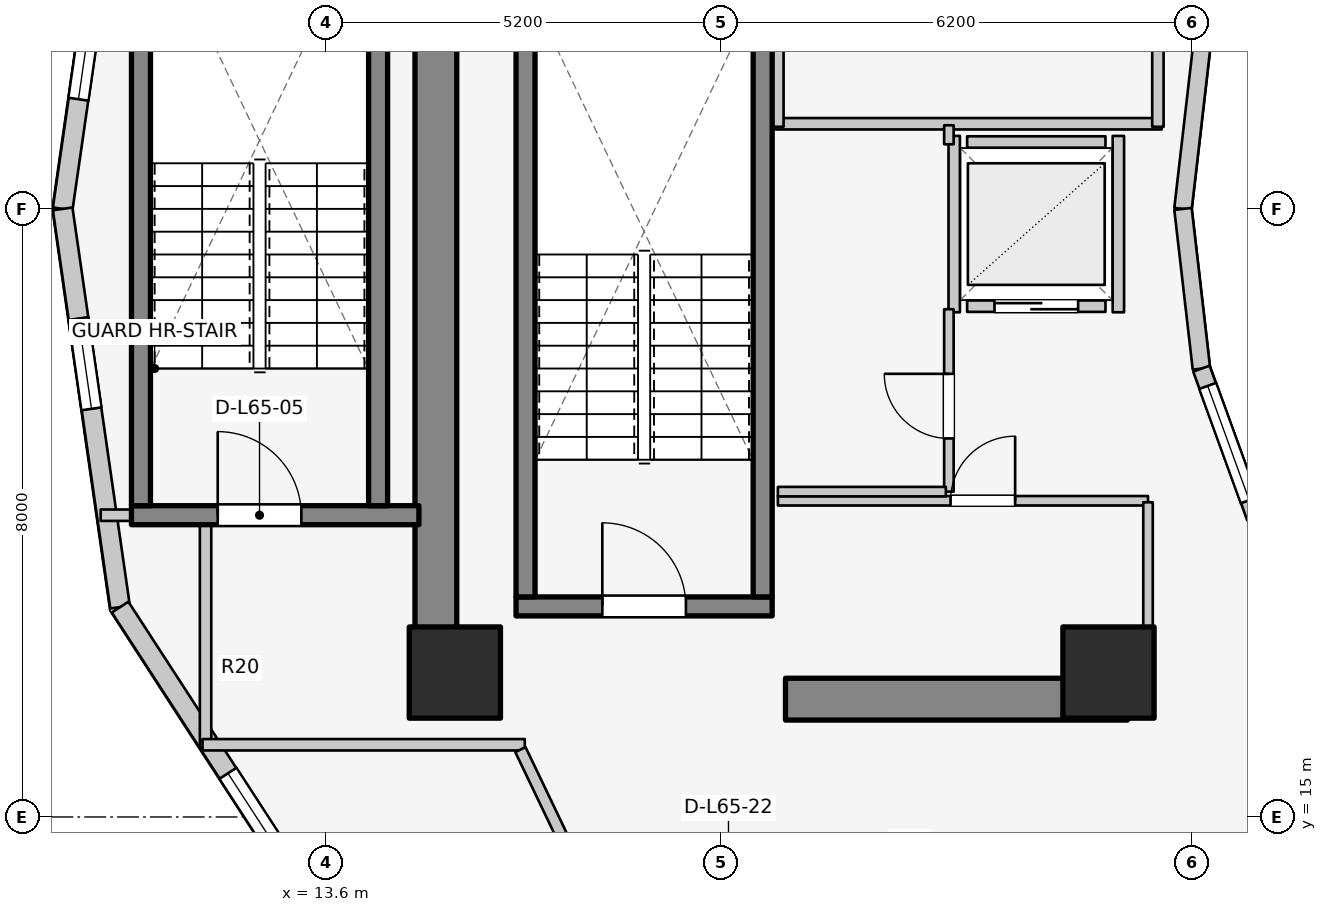
"""IFC4 building model, lengths in metres.
Left out: names, types, materials, properties, quantities, classifications, styles, units other than length and angle.
Written with IfcOpenShell. Run it as: python <this file> out.ifc"""

import sys

from ifc_helpers import new_model, si_unit, direction, frame, frame_2d, origin, origin_2d, place, context, subcontext, project, spatial, rectangle, extrude, element, fill, save


model = new_model("IFC4")
c1 = context("Model", 3, precision=1e-05, world=origin(), true_north=direction((0.0, 1.0)))
c2 = subcontext(c1, "Body", "Model", "MODEL_VIEW")
j1 = project(units=[si_unit("LENGTHUNIT", "METRE"), si_unit("PLANEANGLEUNIT", "RADIAN")], contexts=[c1])
p1 = place(None, origin())
s1 = spatial("IfcSite", under=j1, at=p1, CompositionType="ELEMENT")
p2 = place(p1, origin())
s2 = spatial("IfcBuilding", under=s1, at=p2, CompositionType="ELEMENT")
p3 = place(p2, frame((0.0, 0.0, 214.0)))
s3 = spatial("IfcBuildingStorey", under=s2, at=p3, CompositionType="ELEMENT", Elevation=214.0)
p4 = place(p3, frame((15.05, 17.05, 0.0), z_axis=(0.0, 0.0, 1.0), x_axis=(0.0, 1.0, 0.0)))
e1 = element("IfcWall", 1, at=p4, inside=s3, PredefinedType="SHEAR", context=c2, shape_type="SweptSolid", body=[
    extrude(rectangle(XDim=12.8, YDim=0.55, at=frame_2d((6.4, 0.0))), origin(), (0.0, 0.0, 1.0), 3.1),
])
p5 = place(p3, frame((19.65, 16.55, 0.0), z_axis=(0.0, 0.0, 1.0), x_axis=(1.0, 0.0, 0.0)))
e2 = element("IfcWall", 2, at=p5, inside=s3, PredefinedType="SHEAR", context=c2, shape_type="SweptSolid", body=[
    extrude(rectangle(XDim=4.5, YDim=0.55, at=frame_2d((2.25, 0.0))), origin(), (0.0, 0.0, 1.0), 3.1),
])
p6 = place(p3, frame((16.105, 17.77, 0.0), z_axis=(0.0, 0.0, 1.0), x_axis=(1.0, 0.0, 0.0)))
e3 = element("IfcWall", 3, at=p6, inside=s3, PredefinedType="SOLIDWALL", context=c2, shape_type="SweptSolid", body=[
    extrude(rectangle(XDim=3.37, YDim=0.25, at=frame_2d((1.685, 0.0))), origin(), (0.0, 0.0, 1.0), 3.1),
])
p7 = place(p6, frame((1.135, 0.0, 0.0)))
e4 = element("IfcOpeningElement", 4, at=p7, cuts=e3, PredefinedType="OPENING", context=c2, shape_type="SweptSolid", body=[
    extrude(rectangle(XDim=1.1, YDim=2.1, at=frame_2d((0.55, 1.05))), frame((0.0, 0.135, 0.0), z_axis=(0.0, -1.0, 0.0), x_axis=(1.0, 0.0, 0.0)), (0.0, 0.0, 1.0), 0.27),
])
for number, where, z_axis, x_axis in (
    (5, (16.23, 17.895, 0.0), (0.0, 0.0, 1.0), (0.0, 1.0, 0.0)),
    (6, (19.35, 17.895, 0.0), (0.0, 0.0, 1.0), (0.0, 1.0, 0.0)),
):
    element("IfcWall", number, at=place(p3, frame(where, z_axis=z_axis, x_axis=x_axis)), inside=s3, PredefinedType="SOLIDWALL", context=c2, shape_type="SweptSolid", body=[
        extrude(rectangle(XDim=7.81, YDim=0.25, at=frame_2d((3.905, 0.0))), origin(), (0.0, 0.0, 1.0), 3.1),
    ])
p8 = place(p3, frame((11.045, 18.97, 0.0), z_axis=(0.0, 0.0, 1.0), x_axis=(1.0, 0.0, 0.0)))
e7 = element("IfcWall", 7, at=p8, inside=s3, PredefinedType="SOLIDWALL", context=c2, shape_type="SweptSolid", body=[
    extrude(rectangle(XDim=3.782, YDim=0.25, at=frame_2d((1.891, 0.0))), origin(), (0.0, 0.0, 1.0), 3.1),
])
p9 = place(p8, frame((1.135, 0.0, 0.0)))
e8 = element("IfcOpeningElement", 8, at=p9, cuts=e7, PredefinedType="OPENING", context=c2, shape_type="SweptSolid", body=[
    extrude(rectangle(XDim=1.1, YDim=2.1, at=frame_2d((0.55, 1.05))), frame((0.0, 0.135, 0.0), z_axis=(0.0, -1.0, 0.0), x_axis=(1.0, 0.0, 0.0)), (0.0, 0.0, 1.0), 0.27),
])
for number, where, z_axis, x_axis in (
    (9, (11.17, 19.095, 0.0), (0.0, 0.0, 1.0), (0.0, 1.0, 0.0)),
    (10, (14.29, 19.095, 0.0), (0.0, 0.0, 1.0), (0.0, 1.0, 0.0)),
):
    element("IfcWall", number, at=place(p3, frame(where, z_axis=z_axis, x_axis=x_axis)), inside=s3, PredefinedType="SOLIDWALL", context=c2, shape_type="SweptSolid", body=[
        extrude(rectangle(XDim=7.81, YDim=0.25, at=frame_2d((3.905, 0.0))), origin(), (0.0, 0.0, 1.0), 3.1),
    ])
for number, where, z_axis, x_axis in (
    (11, (15.3, 16.9, 0.0), (0.0, 0.0, 1.0), (1.0, 0.0, 0.0)),
    (12, (23.9, 16.9, 0.0), (0.0, 0.0, 1.0), (1.0, 0.0, 0.0)),
):
    element("IfcColumn", number, at=place(p3, frame(where, z_axis=z_axis, x_axis=x_axis)), inside=s3, PredefinedType="COLUMN", context=c2, shape_type="SweptSolid", body=[
        extrude(rectangle(XDim=1.2, YDim=1.2, at=origin_2d()), origin(), (0.0, 0.0, 1.0), 3.1),
    ])
for number, where, z_axis, x_axis in (
    (13, (25.123, 25.102, 0.0), (0.0, 0.0, 1.0), (-0.115, -0.993, 0.0)),
    (14, (24.88, 23.0, 0.0), (0.0, 0.0, 1.0), (0.115, -0.993, 0.0)),
):
    element("IfcWall", number, at=place(p3, frame(where, z_axis=z_axis, x_axis=x_axis)), inside=s3, PredefinedType="STANDARD", context=c2, shape_type="SweptSolid", body=[
        extrude(rectangle(XDim=2.115, YDim=0.23, at=frame_2d((1.058, 0.0))), origin(), (0.0, 0.0, 1.0), 2.84),
    ])
p10 = place(p3, frame((25.123, 20.898, 0.0), z_axis=(0.0, 0.0, 1.0), x_axis=(0.341423187295, -0.93990968033, 0.0)))
e15 = element("IfcWall", 15, at=p10, inside=s3, PredefinedType="STANDARD", context=c2, shape_type="SweptSolid", body=[
    extrude(rectangle(XDim=2.084, YDim=0.23, at=frame_2d((1.042, 0.0))), origin(), (0.0, 0.0, 1.0), 2.84),
])
p11 = place(p10, frame((0.242, 0.0, 0.85)))
e16 = element("IfcOpeningElement", 16, at=p11, cuts=e15, PredefinedType="OPENING", context=c2, shape_type="SweptSolid", body=[
    extrude(rectangle(XDim=1.6, YDim=1.65, at=frame_2d((0.8, 0.825))), frame((0.0, 0.125, 0.0), z_axis=(0.0, -1.0, 0.0), x_axis=(1.0, 0.0, 0.0)), (0.0, 0.0, 1.0), 0.25),
])
p12 = place(p3, frame((10.895, 28.239, 0.0), z_axis=(0.0, 0.0, 1.0), x_axis=(-0.142712754019, -0.989764148593, 0.0)))
e17 = element("IfcWall", 17, at=p12, inside=s3, PredefinedType="STANDARD", context=c2, shape_type="SweptSolid", body=[
    extrude(rectangle(XDim=5.293, YDim=0.26, at=frame_2d((2.646, 0.0))), origin(), (0.0, 0.0, 1.0), 2.85),
])
p13 = place(p12, frame((2.635, 0.0, 0.75)))
e18 = element("IfcOpeningElement", 18, at=p13, cuts=e17, PredefinedType="OPENING", context=c2, shape_type="SweptSolid", body=[
    extrude(rectangle(XDim=1.2, YDim=1.5, at=frame_2d((0.6, 0.75))), frame((0.0, 0.14, 0.0), z_axis=(0.0, -1.0, 0.0), x_axis=(1.0, 0.0, 0.0)), (0.0, 0.0, 1.0), 0.28),
])
p14 = place(p3, frame((10.14, 23.0, 0.0), z_axis=(0.0, 0.0, 1.0), x_axis=(0.142712754019, -0.989764148593, 0.0)))
e19 = element("IfcWall", 19, at=p14, inside=s3, PredefinedType="STANDARD", context=c2, shape_type="SweptSolid", body=[
    extrude(rectangle(XDim=5.293, YDim=0.26, at=frame_2d((2.646, 0.0))), origin(), (0.0, 0.0, 1.0), 2.85),
])
p15 = place(p14, frame((1.458, 0.0, 0.75)))
e20 = element("IfcOpeningElement", 20, at=p15, cuts=e19, PredefinedType="OPENING", context=c2, shape_type="SweptSolid", body=[
    extrude(rectangle(XDim=1.2, YDim=1.5, at=frame_2d((0.6, 0.75))), frame((0.0, 0.14, 0.0), z_axis=(0.0, -1.0, 0.0), x_axis=(1.0, 0.0, 0.0)), (0.0, 0.0, 1.0), 0.28),
])
p16 = place(p3, frame((10.895, 17.761, 0.0), z_axis=(0.0, 0.0, 1.0), x_axis=(0.544475908819, -0.838776480784, 0.0)))
e21 = element("IfcWall", 21, at=p16, inside=s3, PredefinedType="STANDARD", context=c2, shape_type="SweptSolid", body=[
    extrude(rectangle(XDim=4.305, YDim=0.26, at=frame_2d((2.152, 0.0))), origin(), (0.0, 0.0, 1.0), 2.85),
])
p17 = place(p16, frame((2.607, 0.0, 0.75)))
e22 = element("IfcOpeningElement", 22, at=p17, cuts=e21, PredefinedType="OPENING", context=c2, shape_type="SweptSolid", body=[
    extrude(rectangle(XDim=1.2, YDim=1.5, at=frame_2d((0.6, 0.75))), frame((0.0, 0.14, 0.0), z_axis=(0.0, -1.0, 0.0), x_axis=(1.0, 0.0, 0.0)), (0.0, 0.0, 1.0), 0.28),
])
p18 = place(p3, frame((22.04, 21.72, 0.0), z_axis=(0.0, 0.0, 1.0), x_axis=(1.0, 0.0, 0.0)))
e23 = element("IfcWall", 23, at=p18, inside=s3, PredefinedType="SOLIDWALL", context=c2, shape_type="SweptSolid", body=[
    extrude(rectangle(XDim=1.82, YDim=0.15, at=frame_2d((0.91, 0.0))), origin(), (0.0, 0.0, 1.0), 2.12),
])
p19 = place(p18, frame((0.36, 0.0, 0.0)))
e24 = element("IfcOpeningElement", 24, at=p19, cuts=e23, PredefinedType="OPENING", context=c2, shape_type="SweptSolid", body=[
    extrude(rectangle(XDim=1.1, YDim=2.1, at=frame_2d((0.55, 1.05))), frame((0.0, 0.085, 0.0), z_axis=(0.0, -1.0, 0.0), x_axis=(1.0, 0.0, 0.0)), (0.0, 0.0, 1.0), 0.17),
])
p20 = place(p3, frame((22.04, 23.88, 0.0), z_axis=(0.0, 0.0, 1.0), x_axis=(1.0, 0.0, 0.0)))
e25 = element("IfcWall", 25, at=p20, inside=s3, PredefinedType="SOLIDWALL", context=c2, shape_type="SweptSolid", body=[
    extrude(rectangle(XDim=1.82, YDim=0.15, at=frame_2d((0.91, 0.0))), origin(), (0.0, 0.0, 1.0), 2.12),
])
p21 = place(p3, frame((21.87, 21.64, 0.0), z_axis=(0.0, 0.0, 1.0), x_axis=(0.0, 1.0, 0.0)))
e26 = element("IfcWall", 26, at=p21, inside=s3, PredefinedType="SOLIDWALL", context=c2, shape_type="SweptSolid", body=[
    extrude(rectangle(XDim=2.32, YDim=0.15, at=frame_2d((1.16, 0.0))), origin(), (0.0, 0.0, 1.0), 2.855),
])
p22 = place(p3, frame((24.03, 21.64, 0.0), z_axis=(0.0, 0.0, 1.0), x_axis=(0.0, 1.0, 0.0)))
e27 = element("IfcWall", 27, at=p22, inside=s3, PredefinedType="SOLIDWALL", context=c2, shape_type="SweptSolid", body=[
    extrude(rectangle(XDim=2.32, YDim=0.15, at=frame_2d((1.16, 0.0))), origin(), (0.0, 0.0, 1.0), 2.12),
])
p23 = place(p3, frame((19.52, 24.12, 0.0), z_axis=(0.0, 0.0, 1.0), x_axis=(1.0, 0.0, 0.0)))
e28 = element("IfcWall", 28, at=p23, inside=s3, PredefinedType="PARTITIONING", context=c2, shape_type="SweptSolid", body=[
    extrude(rectangle(XDim=5.08, YDim=0.15, at=frame_2d((2.54, 0.0))), origin(), (0.0, 0.0, 1.0), 2.12),
])
p24 = place(p3, frame((19.55, 24.08, 0.0), z_axis=(0.0, 0.0, 1.0), x_axis=(0.0, 1.0, 0.0)))
e29 = element("IfcWall", 29, at=p24, inside=s3, PredefinedType="PARTITIONING", context=c2, shape_type="SweptSolid", body=[
    extrude(rectangle(XDim=3.2, YDim=0.15, at=frame_2d((1.6, 0.0))), origin(), (0.0, 0.0, 1.0), 2.855),
])
p25 = place(p3, frame((24.55, 24.08, 0.0), z_axis=(0.0, 0.0, 1.0), x_axis=(0.0, 1.0, 0.0)))
e30 = element("IfcWall", 30, at=p25, inside=s3, PredefinedType="PARTITIONING", context=c2, shape_type="SweptSolid", body=[
    extrude(rectangle(XDim=3.4, YDim=0.15, at=frame_2d((1.7, 0.0))), origin(), (0.0, 0.0, 1.0), 2.855),
])
p26 = place(p25, frame((1.894, 0.0, 0.0)))
e31 = element("IfcOpeningElement", 31, at=p26, cuts=e30, PredefinedType="OPENING", context=c2, shape_type="SweptSolid", body=[
    extrude(rectangle(XDim=1.1, YDim=2.1, at=frame_2d((0.55, 1.05))), frame((0.0, 0.085, 0.0), z_axis=(0.0, -1.0, 0.0), x_axis=(1.0, 0.0, 0.0)), (0.0, 0.0, 1.0), 0.17),
])
p27 = place(p3, frame((19.55, 19.16, 0.0), z_axis=(0.0, 0.0, 1.0), x_axis=(1.0, 0.0, 0.0)))
e32 = element("IfcWall", 32, at=p27, inside=s3, PredefinedType="PARTITIONING", context=c2, shape_type="SweptSolid", body=[
    extrude(rectangle(XDim=4.87, YDim=0.125, at=frame_2d((2.435, 0.0))), origin(), (0.0, 0.0, 1.0), 2.12),
])
p28 = place(p27, frame((2.272, 0.0, 0.0)))
e33 = element("IfcOpeningElement", 33, at=p28, cuts=e32, PredefinedType="OPENING", context=c2, shape_type="SweptSolid", body=[
    extrude(rectangle(XDim=0.85, YDim=2.05, at=frame_2d((0.425, 1.025))), frame((0.0, 0.073, 0.0), z_axis=(0.0, -1.0, 0.0), x_axis=(1.0, 0.0, 0.0)), (0.0, 0.0, 1.0), 0.145),
])
p29 = place(p3, frame((24.42, 17.1, 0.0), z_axis=(0.0, 0.0, 1.0), x_axis=(0.0, 1.0, 0.0)))
e34 = element("IfcWall", 34, at=p29, inside=s3, PredefinedType="PARTITIONING", context=c2, shape_type="SweptSolid", body=[
    extrude(rectangle(XDim=2.04, YDim=0.125, at=frame_2d((1.02, 0.0))), origin(), (0.0, 0.0, 1.0), 2.232),
])
p30 = place(p3, frame((21.8, 19.28, 0.0), z_axis=(0.0, 0.0, 1.0), x_axis=(0.0, 1.0, 0.0)))
e35 = element("IfcWall", 35, at=p30, inside=s3, PredefinedType="PARTITIONING", context=c2, shape_type="SweptSolid", body=[
    extrude(rectangle(XDim=2.4, YDim=0.125, at=frame_2d((1.2, 0.0))), origin(), (0.0, 0.0, 1.0), 2.855),
])
p31 = place(p30, frame((0.7, 0.0, 0.0)))
e36 = element("IfcOpeningElement", 36, at=p31, cuts=e35, PredefinedType="OPENING", context=c2, shape_type="SweptSolid", body=[
    extrude(rectangle(XDim=0.85, YDim=2.05, at=frame_2d((0.425, 1.025))), frame((0.0, 0.073, 0.0), z_axis=(0.0, -1.0, 0.0), x_axis=(1.0, 0.0, 0.0)), (0.0, 0.0, 1.0), 0.145),
])
p32 = place(p3, frame((21.8, 23.85, 0.0), z_axis=(0.0, 0.0, 1.0), x_axis=(0.0, 1.0, 0.0)))
e37 = element("IfcWall", 37, at=p32, inside=s3, PredefinedType="PARTITIONING", context=c2, shape_type="SweptSolid", body=[
    extrude(rectangle(XDim=0.25, YDim=0.125, at=frame_2d((0.125, 0.0))), origin(), (0.0, 0.0, 1.0), 2.855),
])
p33 = place(p3, frame((19.55, 19.28, 0.0), z_axis=(0.0, 0.0, 1.0), x_axis=(1.0, 0.0, 0.0)))
e38 = element("IfcWall", 38, at=p33, inside=s3, PredefinedType="PARTITIONING", context=c2, shape_type="SweptSolid", body=[
    extrude(rectangle(XDim=2.21, YDim=0.125, at=frame_2d((1.105, 0.0))), origin(), (0.0, 0.0, 1.0), 2.12),
])
p34 = place(p3, frame((10.64, 18.97, 0.0), z_axis=(0.0, 0.0, 1.0), x_axis=(1.0, 0.0, 0.0)))
e39 = element("IfcWall", 39, at=p34, inside=s3, PredefinedType="PARTITIONING", context=c2, shape_type="SweptSolid", body=[
    extrude(rectangle(XDim=0.4, YDim=0.15, at=frame_2d((0.2, 0.0))), origin(), (0.0, 0.0, 1.0), 2.855),
])
p35 = place(p3, frame((12.02, 15.91, 0.0), z_axis=(0.0, 0.0, 1.0), x_axis=(0.0, 1.0, 0.0)))
e40 = element("IfcWall", 40, at=p35, inside=s3, PredefinedType="PARTITIONING", context=c2, shape_type="SweptSolid", body=[
    extrude(rectangle(XDim=2.93, YDim=0.15, at=frame_2d((1.465, 0.0))), origin(), (0.0, 0.0, 1.0), 2.855),
])
p36 = place(p3, frame((11.98, 15.95, 0.0), z_axis=(0.0, 0.0, 1.0), x_axis=(1.0, 0.0, 0.0)))
e41 = element("IfcWall", 41, at=p36, inside=s3, PredefinedType="PARTITIONING", context=c2, shape_type="SweptSolid", body=[
    extrude(rectangle(XDim=4.24, YDim=0.15, at=frame_2d((2.12, 0.0))), origin(), (0.0, 0.0, 1.0), 2.22),
])
p37 = place(p3, frame((17.222, 13.675, 0.0), z_axis=(0.0, 0.0, 1.0), x_axis=(-0.431973389813, 0.901886351207, 0.0)))
e42 = element("IfcWall", 42, at=p37, inside=s3, PredefinedType="PARTITIONING", context=c2, shape_type="SweptSolid", body=[
    extrude(rectangle(XDim=2.452, YDim=0.15, at=frame_2d((1.226, 0.0))), origin(), (0.0, 0.0, 1.0), 2.855),
])
p38 = place(p11, origin())
e43 = element("IfcWindow", 43, at=p38, inside=s3, PartitioningType="SINGLE_PANEL", PredefinedType="WINDOW", context=c2, shape_type="SweptSolid", body=[
    extrude(rectangle(XDim=1.6, YDim=1.65, at=frame_2d((0.8, 0.825))), frame((0.0, 0.03, 0.0), z_axis=(0.0, -1.0, 0.0), x_axis=(1.0, 0.0, 0.0)), (0.0, 0.0, 1.0), 0.06),
])
fill(e16, e43)
p39 = place(p13, origin())
e44 = element("IfcWindow", 44, at=p39, inside=s3, PartitioningType="SINGLE_PANEL", PredefinedType="WINDOW", context=c2, shape_type="SweptSolid", body=[
    extrude(rectangle(XDim=1.2, YDim=1.5, at=frame_2d((0.6, 0.75))), frame((0.0, 0.03, 0.0), z_axis=(0.0, -1.0, 0.0), x_axis=(1.0, 0.0, 0.0)), (0.0, 0.0, 1.0), 0.06),
])
fill(e18, e44)
p40 = place(p15, origin())
e45 = element("IfcWindow", 45, at=p40, inside=s3, PartitioningType="SINGLE_PANEL", PredefinedType="WINDOW", context=c2, shape_type="SweptSolid", body=[
    extrude(rectangle(XDim=1.2, YDim=1.5, at=frame_2d((0.6, 0.75))), frame((0.0, 0.03, 0.0), z_axis=(0.0, -1.0, 0.0), x_axis=(1.0, 0.0, 0.0)), (0.0, 0.0, 1.0), 0.06),
])
fill(e20, e45)
p41 = place(p17, origin())
e46 = element("IfcWindow", 46, at=p41, inside=s3, PartitioningType="SINGLE_PANEL", PredefinedType="WINDOW", context=c2, shape_type="SweptSolid", body=[
    extrude(rectangle(XDim=1.2, YDim=1.5, at=frame_2d((0.6, 0.75))), frame((0.0, 0.03, 0.0), z_axis=(0.0, -1.0, 0.0), x_axis=(1.0, 0.0, 0.0)), (0.0, 0.0, 1.0), 0.06),
])
fill(e22, e46)
p42 = place(p7, origin())
e47 = element("IfcDoor", 47, at=p42, inside=s3, OperationType="SINGLE_SWING_LEFT", PredefinedType="DOOR", context=c2, shape_type="SweptSolid", body=[
    extrude(rectangle(XDim=1.1, YDim=2.1, at=frame_2d((0.55, 1.05))), frame((0.0, 0.025, 0.0), z_axis=(0.0, -1.0, 0.0), x_axis=(1.0, 0.0, 0.0)), (0.0, 0.0, 1.0), 0.05),
])
fill(e4, e47)
p43 = place(p9, origin())
e48 = element("IfcDoor", 48, at=p43, inside=s3, OperationType="SINGLE_SWING_LEFT", PredefinedType="DOOR", context=c2, shape_type="SweptSolid", body=[
    extrude(rectangle(XDim=1.1, YDim=2.1, at=frame_2d((0.55, 1.05))), frame((0.0, 0.025, 0.0), z_axis=(0.0, -1.0, 0.0), x_axis=(1.0, 0.0, 0.0)), (0.0, 0.0, 1.0), 0.05),
])
fill(e8, e48)
p44 = place(p19, origin())
e49 = element("IfcDoor", 49, at=p44, inside=s3, OperationType="DOUBLE_DOOR_SLIDING", PredefinedType="DOOR", context=c2, shape_type="SweptSolid", body=[
    extrude(rectangle(XDim=1.1, YDim=2.1, at=frame_2d((0.55, 1.05))), frame((0.0, 0.025, 0.0), z_axis=(0.0, -1.0, 0.0), x_axis=(1.0, 0.0, 0.0)), (0.0, 0.0, 1.0), 0.05),
])
fill(e24, e49)
p45 = place(p28, origin())
e50 = element("IfcDoor", 50, at=p45, inside=s3, OperationType="SINGLE_SWING_RIGHT", PredefinedType="DOOR", context=c2, shape_type="SweptSolid", body=[
    extrude(rectangle(XDim=0.85, YDim=2.05, at=frame_2d((0.425, 1.025))), frame((0.0, 0.025, 0.0), z_axis=(0.0, -1.0, 0.0), x_axis=(1.0, 0.0, 0.0)), (0.0, 0.0, 1.0), 0.05),
])
fill(e33, e50)
p46 = place(p31, origin())
e51 = element("IfcDoor", 51, at=p46, inside=s3, OperationType="SINGLE_SWING_RIGHT", PredefinedType="DOOR", context=c2, shape_type="SweptSolid", body=[
    extrude(rectangle(XDim=0.85, YDim=2.05, at=frame_2d((0.425, 1.025))), frame((0.0, 0.025, 0.0), z_axis=(0.0, -1.0, 0.0), x_axis=(1.0, 0.0, 0.0)), (0.0, 0.0, 1.0), 0.05),
])
fill(e36, e51)
save(model, sys.argv[1])
